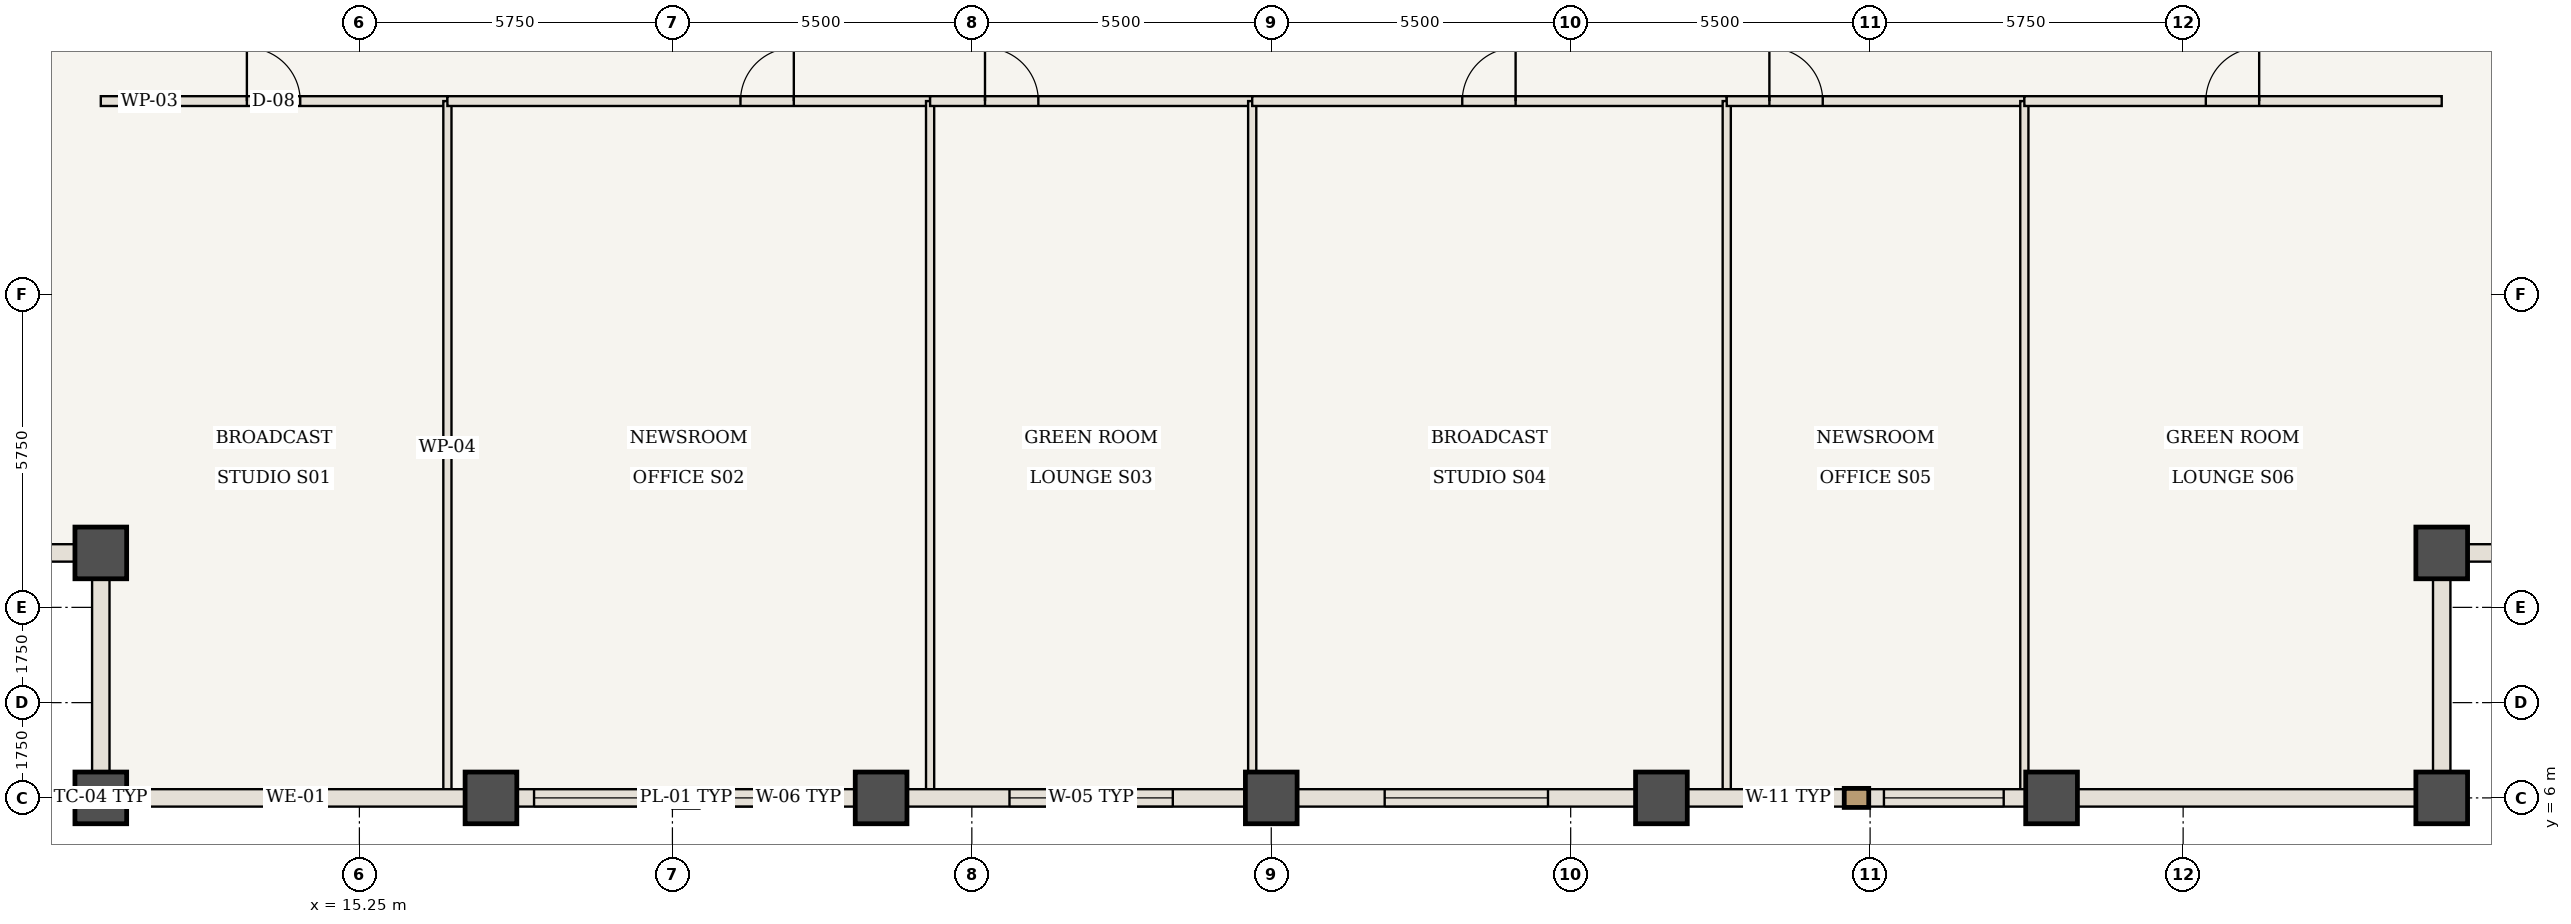
"""IFC4 building model, lengths in metres.
Left out: names, types, materials, properties, quantities, classifications, styles, units other than length and angle.
Written with IfcOpenShell. Run it as: python <this file> out.ifc"""

import sys

from ifc_helpers import new_model, si_unit, direction, frame, frame_2d, origin, origin_2d, place, context, subcontext, project, spatial, rectangle, extrude, element, fill, save


model = new_model("IFC4")
c1 = context("Model", 3, precision=1e-05, world=origin(), true_north=direction((0.0, 1.0)))
c2 = subcontext(c1, "Body", "Model", "MODEL_VIEW")
j1 = project(units=[si_unit("LENGTHUNIT", "METRE"), si_unit("PLANEANGLEUNIT", "RADIAN")], contexts=[c1])
p1 = place(None, origin())
s1 = spatial("IfcSite", under=j1, at=p1, CompositionType="ELEMENT")
p2 = place(p1, origin())
s2 = spatial("IfcBuilding", under=s1, at=p2, CompositionType="ELEMENT")
p3 = place(p2, frame((0.0, 0.0, 160.65)))
s3 = spatial("IfcBuildingStorey", under=s2, at=p3, CompositionType="ELEMENT", Elevation=160.65)
for number, where, z_axis, x_axis in (
    (1, (10.5, 6.0, 0.0), (0.0, 0.0, 1.0), (1.0, 0.0, 0.0)),
    (2, (10.5, 10.5, 0.0), (0.0, 0.0, 1.0), (1.0, 0.0, 0.0)),
    (3, (53.5, 6.0, 0.0), (0.0, 0.0, 1.0), (1.0, 0.0, 0.0)),
    (4, (53.5, 10.5, 0.0), (0.0, 0.0, 1.0), (1.0, 0.0, 0.0)),
    (5, (17.667, 6.0, 0.0), (0.0, 0.0, 1.0), (1.0, 0.0, 0.0)),
    (6, (24.833, 6.0, 0.0), (0.0, 0.0, 1.0), (1.0, 0.0, 0.0)),
    (7, (32.0, 6.0, 0.0), (0.0, 0.0, 1.0), (1.0, 0.0, 0.0)),
    (8, (39.167, 6.0, 0.0), (0.0, 0.0, 1.0), (1.0, 0.0, 0.0)),
    (9, (46.333, 6.0, 0.0), (0.0, 0.0, 1.0), (1.0, 0.0, 0.0)),
):
    element("IfcColumn", number, at=place(p3, frame(where, z_axis=z_axis, x_axis=x_axis)), inside=s3, PredefinedType="COLUMN", context=c2, shape_type="SweptSolid", body=[
        extrude(rectangle(XDim=0.95, YDim=0.95, at=origin_2d()), origin(), (0.0, 0.0, 1.0), 3.85),
    ])
p4 = place(p3, frame((10.5, 18.8, 0.0), z_axis=(0.0, 0.0, 1.0), x_axis=(1.0, 0.0, 0.0)))
e10 = element("IfcWall", 10, at=p4, inside=s3, PredefinedType="STANDARD", context=c2, shape_type="SweptSolid", body=[
    extrude(rectangle(XDim=6.367, YDim=0.18, at=frame_2d((3.183, 0.0))), origin(), (0.0, 0.0, 1.0), 3.685),
])
p5 = place(p4, frame((2.683, 0.0, 0.0)))
e11 = element("IfcOpeningElement", 11, at=p5, cuts=e10, PredefinedType="OPENING", context=c2, shape_type="SweptSolid", body=[
    extrude(rectangle(XDim=0.98, YDim=2.2, at=frame_2d((0.49, 1.1))), frame((0.0, 0.1, 0.0), z_axis=(0.0, -1.0, 0.0), x_axis=(1.0, 0.0, 0.0)), (0.0, 0.0, 1.0), 0.2),
])
p6 = place(p3, frame((16.867, 6.06, 0.0), z_axis=(0.0, 0.0, 1.0), x_axis=(0.0, 1.0, 0.0)))
e12 = element("IfcWall", 12, at=p6, inside=s3, PredefinedType="STANDARD", context=c2, shape_type="SweptSolid", body=[
    extrude(rectangle(XDim=12.74, YDim=0.15, at=frame_2d((6.37, 0.0))), origin(), (0.0, 0.0, 1.0), 3.685),
])
p7 = place(p3, frame((16.867, 18.8, 0.0), z_axis=(0.0, 0.0, 1.0), x_axis=(1.0, 0.0, 0.0)))
e13 = element("IfcWall", 13, at=p7, inside=s3, PredefinedType="STANDARD", context=c2, shape_type="SweptSolid", body=[
    extrude(rectangle(XDim=8.867, YDim=0.18, at=frame_2d((4.433, 0.0))), origin(), (0.0, 0.0, 1.0), 3.685),
])
p8 = place(p7, frame((5.383, 0.0, 0.0)))
e14 = element("IfcOpeningElement", 14, at=p8, cuts=e13, PredefinedType="OPENING", context=c2, shape_type="SweptSolid", body=[
    extrude(rectangle(XDim=0.98, YDim=2.2, at=frame_2d((0.49, 1.1))), frame((0.0, 0.1, 0.0), z_axis=(0.0, -1.0, 0.0), x_axis=(1.0, 0.0, 0.0)), (0.0, 0.0, 1.0), 0.2),
])
p9 = place(p3, frame((25.733, 6.06, 0.0), z_axis=(0.0, 0.0, 1.0), x_axis=(0.0, 1.0, 0.0)))
e15 = element("IfcWall", 15, at=p9, inside=s3, PredefinedType="STANDARD", context=c2, shape_type="SweptSolid", body=[
    extrude(rectangle(XDim=12.74, YDim=0.15, at=frame_2d((6.37, 0.0))), origin(), (0.0, 0.0, 1.0), 3.685),
])
p10 = place(p3, frame((25.733, 18.8, 0.0), z_axis=(0.0, 0.0, 1.0), x_axis=(1.0, 0.0, 0.0)))
e16 = element("IfcWall", 16, at=p10, inside=s3, PredefinedType="STANDARD", context=c2, shape_type="SweptSolid", body=[
    extrude(rectangle(XDim=5.917, YDim=0.18, at=frame_2d((2.958, 0.0))), origin(), (0.0, 0.0, 1.0), 3.685),
])
p11 = place(p10, frame((1.008, 0.0, 0.0)))
e17 = element("IfcOpeningElement", 17, at=p11, cuts=e16, PredefinedType="OPENING", context=c2, shape_type="SweptSolid", body=[
    extrude(rectangle(XDim=0.98, YDim=2.2, at=frame_2d((0.49, 1.1))), frame((0.0, 0.1, 0.0), z_axis=(0.0, -1.0, 0.0), x_axis=(1.0, 0.0, 0.0)), (0.0, 0.0, 1.0), 0.2),
])
p12 = place(p3, frame((31.65, 6.06, 0.0), z_axis=(0.0, 0.0, 1.0), x_axis=(0.0, 1.0, 0.0)))
e18 = element("IfcWall", 18, at=p12, inside=s3, PredefinedType="STANDARD", context=c2, shape_type="SweptSolid", body=[
    extrude(rectangle(XDim=12.74, YDim=0.15, at=frame_2d((6.37, 0.0))), origin(), (0.0, 0.0, 1.0), 3.685),
])
p13 = place(p3, frame((31.65, 18.8, 0.0), z_axis=(0.0, 0.0, 1.0), x_axis=(1.0, 0.0, 0.0)))
e19 = element("IfcWall", 19, at=p13, inside=s3, PredefinedType="STANDARD", context=c2, shape_type="SweptSolid", body=[
    extrude(rectangle(XDim=8.717, YDim=0.18, at=frame_2d((4.358, 0.0))), origin(), (0.0, 0.0, 1.0), 3.685),
])
p14 = place(p13, frame((3.858, 0.0, 0.0)))
e20 = element("IfcOpeningElement", 20, at=p14, cuts=e19, PredefinedType="OPENING", context=c2, shape_type="SweptSolid", body=[
    extrude(rectangle(XDim=0.98, YDim=2.2, at=frame_2d((0.49, 1.1))), frame((0.0, 0.1, 0.0), z_axis=(0.0, -1.0, 0.0), x_axis=(1.0, 0.0, 0.0)), (0.0, 0.0, 1.0), 0.2),
])
p15 = place(p3, frame((40.367, 6.06, 0.0), z_axis=(0.0, 0.0, 1.0), x_axis=(0.0, 1.0, 0.0)))
e21 = element("IfcWall", 21, at=p15, inside=s3, PredefinedType="STANDARD", context=c2, shape_type="SweptSolid", body=[
    extrude(rectangle(XDim=12.74, YDim=0.15, at=frame_2d((6.37, 0.0))), origin(), (0.0, 0.0, 1.0), 3.685),
])
p16 = place(p3, frame((40.367, 18.8, 0.0), z_axis=(0.0, 0.0, 1.0), x_axis=(1.0, 0.0, 0.0)))
e22 = element("IfcWall", 22, at=p16, inside=s3, PredefinedType="STANDARD", context=c2, shape_type="SweptSolid", body=[
    extrude(rectangle(XDim=5.467, YDim=0.18, at=frame_2d((2.733, 0.0))), origin(), (0.0, 0.0, 1.0), 3.685),
])
p17 = place(p16, frame((0.783, 0.0, 0.0)))
e23 = element("IfcOpeningElement", 23, at=p17, cuts=e22, PredefinedType="OPENING", context=c2, shape_type="SweptSolid", body=[
    extrude(rectangle(XDim=0.98, YDim=2.2, at=frame_2d((0.49, 1.1))), frame((0.0, 0.1, 0.0), z_axis=(0.0, -1.0, 0.0), x_axis=(1.0, 0.0, 0.0)), (0.0, 0.0, 1.0), 0.2),
])
p18 = place(p3, frame((45.833, 6.06, 0.0), z_axis=(0.0, 0.0, 1.0), x_axis=(0.0, 1.0, 0.0)))
e24 = element("IfcWall", 24, at=p18, inside=s3, PredefinedType="STANDARD", context=c2, shape_type="SweptSolid", body=[
    extrude(rectangle(XDim=12.74, YDim=0.15, at=frame_2d((6.37, 0.0))), origin(), (0.0, 0.0, 1.0), 3.685),
])
p19 = place(p3, frame((45.833, 18.8, 0.0), z_axis=(0.0, 0.0, 1.0), x_axis=(1.0, 0.0, 0.0)))
e25 = element("IfcWall", 25, at=p19, inside=s3, PredefinedType="STANDARD", context=c2, shape_type="SweptSolid", body=[
    extrude(rectangle(XDim=7.667, YDim=0.18, at=frame_2d((3.833, 0.0))), origin(), (0.0, 0.0, 1.0), 3.685),
])
p20 = place(p19, frame((3.333, 0.0, 0.0)))
e26 = element("IfcOpeningElement", 26, at=p20, cuts=e25, PredefinedType="OPENING", context=c2, shape_type="SweptSolid", body=[
    extrude(rectangle(XDim=0.98, YDim=2.2, at=frame_2d((0.49, 1.1))), frame((0.0, 0.1, 0.0), z_axis=(0.0, -1.0, 0.0), x_axis=(1.0, 0.0, 0.0)), (0.0, 0.0, 1.0), 0.2),
])
p21 = place(p3, frame((17.667, 6.0, 0.0), z_axis=(0.0, 0.0, 1.0), x_axis=(-1.0, 0.0, 0.0)))
e27 = element("IfcWall", 27, at=p21, inside=s3, PredefinedType="USERDEFINED", context=c2, shape_type="SweptSolid", body=[
    extrude(rectangle(XDim=7.167, YDim=0.32, at=frame_2d((3.583, 0.0))), origin(), (0.0, 0.0, 1.0), 2.885),
])
p22 = place(p3, frame((24.833, 6.0, 0.0), z_axis=(0.0, 0.0, 1.0), x_axis=(-1.0, 0.0, 0.0)))
e28 = element("IfcWall", 28, at=p22, inside=s3, PredefinedType="USERDEFINED", context=c2, shape_type="SweptSolid", body=[
    extrude(rectangle(XDim=7.167, YDim=0.32, at=frame_2d((3.583, 0.0))), origin(), (0.0, 0.0, 1.0), 2.885),
])
p23 = place(p22, frame((0.792, 0.0, 0.85)))
e29 = element("IfcOpeningElement", 29, at=p23, cuts=e28, PredefinedType="OPENING", context=c2, shape_type="SweptSolid", body=[
    extrude(rectangle(XDim=2.2, YDim=1.835, at=frame_2d((1.1, 0.917))), frame((0.0, 0.17, 0.0), z_axis=(0.0, -1.0, 0.0), x_axis=(1.0, 0.0, 0.0)), (0.0, 0.0, 1.0), 0.34),
])
p24 = place(p22, frame((4.175, 0.0, 0.85)))
e30 = element("IfcOpeningElement", 30, at=p24, cuts=e28, PredefinedType="OPENING", context=c2, shape_type="SweptSolid", body=[
    extrude(rectangle(XDim=2.2, YDim=1.835, at=frame_2d((1.1, 0.917))), frame((0.0, 0.17, 0.0), z_axis=(0.0, -1.0, 0.0), x_axis=(1.0, 0.0, 0.0)), (0.0, 0.0, 1.0), 0.34),
])
p25 = place(p3, frame((32.0, 6.0, 0.0), z_axis=(0.0, 0.0, 1.0), x_axis=(-1.0, 0.0, 0.0)))
e31 = element("IfcWall", 31, at=p25, inside=s3, PredefinedType="USERDEFINED", context=c2, shape_type="SweptSolid", body=[
    extrude(rectangle(XDim=7.167, YDim=0.32, at=frame_2d((3.583, 0.0))), origin(), (0.0, 0.0, 1.0), 2.885),
])
p26 = place(p25, frame((1.808, 0.0, 0.85)))
e32 = element("IfcOpeningElement", 32, at=p26, cuts=e31, PredefinedType="OPENING", context=c2, shape_type="SweptSolid", body=[
    extrude(rectangle(XDim=3.0, YDim=1.835, at=frame_2d((1.5, 0.917))), frame((0.0, 0.17, 0.0), z_axis=(0.0, -1.0, 0.0), x_axis=(1.0, 0.0, 0.0)), (0.0, 0.0, 1.0), 0.34),
])
p27 = place(p3, frame((39.167, 6.0, 0.0), z_axis=(0.0, 0.0, 1.0), x_axis=(-1.0, 0.0, 0.0)))
e33 = element("IfcWall", 33, at=p27, inside=s3, PredefinedType="USERDEFINED", context=c2, shape_type="SweptSolid", body=[
    extrude(rectangle(XDim=7.167, YDim=0.32, at=frame_2d((3.583, 0.0))), origin(), (0.0, 0.0, 1.0), 2.885),
])
p28 = place(p27, frame((2.083, 0.0, 0.85)))
e34 = element("IfcOpeningElement", 34, at=p28, cuts=e33, PredefinedType="OPENING", context=c2, shape_type="SweptSolid", body=[
    extrude(rectangle(XDim=3.0, YDim=1.835, at=frame_2d((1.5, 0.917))), frame((0.0, 0.17, 0.0), z_axis=(0.0, -1.0, 0.0), x_axis=(1.0, 0.0, 0.0)), (0.0, 0.0, 1.0), 0.34),
])
p29 = place(p3, frame((46.333, 6.0, 0.0), z_axis=(0.0, 0.0, 1.0), x_axis=(-1.0, 0.0, 0.0)))
e35 = element("IfcWall", 35, at=p29, inside=s3, PredefinedType="USERDEFINED", context=c2, shape_type="SweptSolid", body=[
    extrude(rectangle(XDim=7.167, YDim=0.32, at=frame_2d((3.583, 0.0))), origin(), (0.0, 0.0, 1.0), 2.885),
])
p30 = place(p29, frame((0.879, 0.0, 0.85)))
e36 = element("IfcOpeningElement", 36, at=p30, cuts=e35, PredefinedType="OPENING", context=c2, shape_type="SweptSolid", body=[
    extrude(rectangle(XDim=2.2, YDim=1.835, at=frame_2d((1.1, 0.917))), frame((0.0, 0.17, 0.0), z_axis=(0.0, -1.0, 0.0), x_axis=(1.0, 0.0, 0.0)), (0.0, 0.0, 1.0), 0.34),
])
p31 = place(p29, frame((4.038, 0.0, 0.85)))
e37 = element("IfcOpeningElement", 37, at=p31, cuts=e35, PredefinedType="OPENING", context=c2, shape_type="SweptSolid", body=[
    extrude(rectangle(XDim=1.6, YDim=1.835, at=frame_2d((0.8, 0.917))), frame((0.0, 0.17, 0.0), z_axis=(0.0, -1.0, 0.0), x_axis=(1.0, 0.0, 0.0)), (0.0, 0.0, 1.0), 0.34),
])
p32 = place(p3, frame((53.5, 6.0, 0.0), z_axis=(0.0, 0.0, 1.0), x_axis=(-1.0, 0.0, 0.0)))
e38 = element("IfcWall", 38, at=p32, inside=s3, PredefinedType="USERDEFINED", context=c2, shape_type="SweptSolid", body=[
    extrude(rectangle(XDim=7.167, YDim=0.32, at=frame_2d((3.583, 0.0))), origin(), (0.0, 0.0, 1.0), 2.885),
])
for number, where, z_axis, x_axis in (
    (39, (10.5, 6.0, 0.0), (0.0, 0.0, 1.0), (0.0, 1.0, 0.0)),
    (40, (10.5, 10.5, 0.0), (0.0, 0.0, 1.0), (-1.0, 0.0, 0.0)),
    (41, (53.5, 10.5, 0.0), (0.0, 0.0, 1.0), (0.0, -1.0, 0.0)),
    (42, (58.0, 10.5, 0.0), (0.0, 0.0, 1.0), (-1.0, 0.0, 0.0)),
):
    element("IfcWall", number, at=place(p3, frame(where, z_axis=z_axis, x_axis=x_axis)), inside=s3, PredefinedType="USERDEFINED", context=c2, shape_type="SweptSolid", body=[
        extrude(rectangle(XDim=4.5, YDim=0.32, at=frame_2d((2.25, 0.0))), origin(), (0.0, 0.0, 1.0), 2.885),
    ])
p33 = place(p5, origin())
e43 = element("IfcDoor", 43, at=p33, inside=s3, OperationType="SINGLE_SWING_LEFT", PredefinedType="DOOR", context=c2, shape_type="SweptSolid", body=[
    extrude(rectangle(XDim=0.98, YDim=2.2, at=frame_2d((0.49, 1.1))), frame((0.0, 0.025, 0.0), z_axis=(0.0, -1.0, 0.0), x_axis=(1.0, 0.0, 0.0)), (0.0, 0.0, 1.0), 0.05),
])
fill(e11, e43)
p34 = place(p8, origin())
e44 = element("IfcDoor", 44, at=p34, inside=s3, OperationType="SINGLE_SWING_RIGHT", PredefinedType="DOOR", context=c2, shape_type="SweptSolid", body=[
    extrude(rectangle(XDim=0.98, YDim=2.2, at=frame_2d((0.49, 1.1))), frame((0.0, 0.025, 0.0), z_axis=(0.0, -1.0, 0.0), x_axis=(1.0, 0.0, 0.0)), (0.0, 0.0, 1.0), 0.05),
])
fill(e14, e44)
p35 = place(p11, origin())
e45 = element("IfcDoor", 45, at=p35, inside=s3, OperationType="SINGLE_SWING_LEFT", PredefinedType="DOOR", context=c2, shape_type="SweptSolid", body=[
    extrude(rectangle(XDim=0.98, YDim=2.2, at=frame_2d((0.49, 1.1))), frame((0.0, 0.025, 0.0), z_axis=(0.0, -1.0, 0.0), x_axis=(1.0, 0.0, 0.0)), (0.0, 0.0, 1.0), 0.05),
])
fill(e17, e45)
p36 = place(p14, origin())
e46 = element("IfcDoor", 46, at=p36, inside=s3, OperationType="SINGLE_SWING_RIGHT", PredefinedType="DOOR", context=c2, shape_type="SweptSolid", body=[
    extrude(rectangle(XDim=0.98, YDim=2.2, at=frame_2d((0.49, 1.1))), frame((0.0, 0.025, 0.0), z_axis=(0.0, -1.0, 0.0), x_axis=(1.0, 0.0, 0.0)), (0.0, 0.0, 1.0), 0.05),
])
fill(e20, e46)
p37 = place(p17, origin())
e47 = element("IfcDoor", 47, at=p37, inside=s3, OperationType="SINGLE_SWING_LEFT", PredefinedType="DOOR", context=c2, shape_type="SweptSolid", body=[
    extrude(rectangle(XDim=0.98, YDim=2.2, at=frame_2d((0.49, 1.1))), frame((0.0, 0.025, 0.0), z_axis=(0.0, -1.0, 0.0), x_axis=(1.0, 0.0, 0.0)), (0.0, 0.0, 1.0), 0.05),
])
fill(e23, e47)
p38 = place(p20, origin())
e48 = element("IfcDoor", 48, at=p38, inside=s3, OperationType="SINGLE_SWING_RIGHT", PredefinedType="DOOR", context=c2, shape_type="SweptSolid", body=[
    extrude(rectangle(XDim=0.98, YDim=2.2, at=frame_2d((0.49, 1.1))), frame((0.0, 0.025, 0.0), z_axis=(0.0, -1.0, 0.0), x_axis=(1.0, 0.0, 0.0)), (0.0, 0.0, 1.0), 0.05),
])
fill(e26, e48)
p39 = place(p23, origin())
e49 = element("IfcWindow", 49, at=p39, inside=s3, PartitioningType="SINGLE_PANEL", PredefinedType="WINDOW", context=c2, shape_type="SweptSolid", body=[
    extrude(rectangle(XDim=2.2, YDim=1.835, at=frame_2d((1.1, 0.917))), frame((0.0, 0.03, 0.0), z_axis=(0.0, -1.0, 0.0), x_axis=(1.0, 0.0, 0.0)), (0.0, 0.0, 1.0), 0.06),
])
fill(e29, e49)
p40 = place(p24, origin())
e50 = element("IfcWindow", 50, at=p40, inside=s3, PartitioningType="SINGLE_PANEL", PredefinedType="WINDOW", context=c2, shape_type="SweptSolid", body=[
    extrude(rectangle(XDim=2.2, YDim=1.835, at=frame_2d((1.1, 0.917))), frame((0.0, 0.03, 0.0), z_axis=(0.0, -1.0, 0.0), x_axis=(1.0, 0.0, 0.0)), (0.0, 0.0, 1.0), 0.06),
])
fill(e30, e50)
p41 = place(p26, origin())
e51 = element("IfcWindow", 51, at=p41, inside=s3, PartitioningType="SINGLE_PANEL", PredefinedType="WINDOW", context=c2, shape_type="SweptSolid", body=[
    extrude(rectangle(XDim=3.0, YDim=1.835, at=frame_2d((1.5, 0.917))), frame((0.0, 0.03, 0.0), z_axis=(0.0, -1.0, 0.0), x_axis=(1.0, 0.0, 0.0)), (0.0, 0.0, 1.0), 0.06),
])
fill(e32, e51)
p42 = place(p28, origin())
e52 = element("IfcWindow", 52, at=p42, inside=s3, PartitioningType="SINGLE_PANEL", PredefinedType="WINDOW", context=c2, shape_type="SweptSolid", body=[
    extrude(rectangle(XDim=3.0, YDim=1.835, at=frame_2d((1.5, 0.917))), frame((0.0, 0.03, 0.0), z_axis=(0.0, -1.0, 0.0), x_axis=(1.0, 0.0, 0.0)), (0.0, 0.0, 1.0), 0.06),
])
fill(e34, e52)
p43 = place(p30, origin())
e53 = element("IfcWindow", 53, at=p43, inside=s3, PartitioningType="SINGLE_PANEL", PredefinedType="WINDOW", context=c2, shape_type="SweptSolid", body=[
    extrude(rectangle(XDim=2.2, YDim=1.835, at=frame_2d((1.1, 0.917))), frame((0.0, 0.03, 0.0), z_axis=(0.0, -1.0, 0.0), x_axis=(1.0, 0.0, 0.0)), (0.0, 0.0, 1.0), 0.06),
])
fill(e36, e53)
p44 = place(p31, origin())
e54 = element("IfcWindow", 54, at=p44, inside=s3, PartitioningType="SINGLE_PANEL", PredefinedType="WINDOW", context=c2, shape_type="SweptSolid", body=[
    extrude(rectangle(XDim=1.6, YDim=1.835, at=frame_2d((0.8, 0.917))), frame((0.0, 0.03, 0.0), z_axis=(0.0, -1.0, 0.0), x_axis=(1.0, 0.0, 0.0)), (0.0, 0.0, 1.0), 0.06),
])
fill(e37, e54)
save(model, sys.argv[1])
